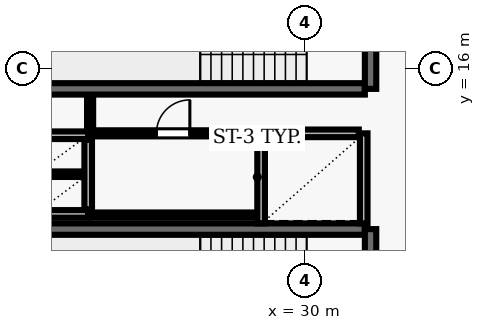
"""IFC4 building model, lengths in metres.
Left out: names, types, materials, properties, quantities, classifications, styles, units other than length and angle.
Written with IfcOpenShell. Run it as: python <this file> out.ifc"""

import sys

from ifc_helpers import new_model, si_unit, direction, frame, frame_2d, origin, place, context, subcontext, project, spatial, rectangle, extrude, element, fill, save


model = new_model("IFC4")
c1 = context("Model", 3, precision=1e-05, world=origin(), true_north=direction((0.0, 1.0)))
c2 = subcontext(c1, "Body", "Model", "MODEL_VIEW")
j1 = project(units=[si_unit("LENGTHUNIT", "METRE"), si_unit("PLANEANGLEUNIT", "RADIAN")], contexts=[c1])
p1 = place(None, origin())
s1 = spatial("IfcSite", under=j1, at=p1, CompositionType="ELEMENT")
p2 = place(p1, origin())
s2 = spatial("IfcBuilding", under=s1, at=p2, CompositionType="ELEMENT")
p3 = place(p2, frame((0.0, 0.0, 42.7)))
s3 = spatial("IfcBuildingStorey", under=s2, at=p3, CompositionType="ELEMENT", Elevation=42.7)
p4 = place(p3, frame((23.22, 15.47, 0.0), z_axis=(0.0, 0.0, 1.0), x_axis=(1.0, 0.0, 0.0)))
e1 = element("IfcWall", 1, at=p4, inside=s3, PredefinedType="SHEAR", context=c2, shape_type="SweptSolid", body=[
    extrude(rectangle(XDim=8.36, YDim=0.3, at=frame_2d((4.18, 0.0))), origin(), (0.0, 0.0, 1.0), 3.69),
])
p5 = place(p3, frame((31.73, 15.47, 0.0), z_axis=(0.0, 0.0, 1.0), x_axis=(0.0, 1.0, 0.0)))
e2 = element("IfcWall", 2, at=p5, inside=s3, PredefinedType="SHEAR", context=c2, shape_type="SweptSolid", body=[
    extrude(rectangle(XDim=3.51, YDim=0.3, at=frame_2d((1.755, 0.0))), origin(), (0.0, 0.0, 1.0), 3.69),
])
p6 = place(p5, frame((1.18, 0.0, 0.0)))
e3 = element("IfcOpeningElement", 3, at=p6, cuts=e2, PredefinedType="OPENING", context=c2, shape_type="SweptSolid", body=[
    extrude(rectangle(XDim=1.15, YDim=2.15, at=frame_2d((0.575, 1.075))), frame((0.0, 0.16, 0.0), z_axis=(0.0, -1.0, 0.0), x_axis=(1.0, 0.0, 0.0)), (0.0, 0.0, 1.0), 0.32),
])
p7 = place(p3, frame((31.58, 11.78, 0.0), z_axis=(0.0, 0.0, 1.0), x_axis=(-1.0, 0.0, 0.0)))
e4 = element("IfcWall", 4, at=p7, inside=s3, PredefinedType="SHEAR", context=c2, shape_type="SweptSolid", body=[
    extrude(rectangle(XDim=8.36, YDim=0.3, at=frame_2d((4.18, 0.0))), origin(), (0.0, 0.0, 1.0), 3.69),
])
p8 = place(p3, frame((31.73, 8.27, 0.0), z_axis=(0.0, 0.0, 1.0), x_axis=(0.0, 1.0, 0.0)))
e5 = element("IfcWall", 5, at=p8, inside=s3, PredefinedType="SHEAR", context=c2, shape_type="SweptSolid", body=[
    extrude(rectangle(XDim=3.51, YDim=0.3, at=frame_2d((1.755, 0.0))), origin(), (0.0, 0.0, 1.0), 3.69),
])
p9 = place(p8, frame((1.18, 0.0, 0.0)))
e6 = element("IfcOpeningElement", 6, at=p9, cuts=e5, PredefinedType="OPENING", context=c2, shape_type="SweptSolid", body=[
    extrude(rectangle(XDim=1.15, YDim=2.15, at=frame_2d((0.575, 1.075))), frame((0.0, 0.16, 0.0), z_axis=(0.0, -1.0, 0.0), x_axis=(1.0, 0.0, 0.0)), (0.0, 0.0, 1.0), 0.32),
])
for number, where, z_axis, x_axis in (
    (7, (28.85, 14.3, 0.0), (0.0, 0.0, 1.0), (0.0, -1.0, 0.0)),
    (8, (31.55, 11.93, 0.0), (0.0, 0.0, 1.0), (0.0, 1.0, 0.0)),
):
    element("IfcWall", number, at=place(p3, frame(where, z_axis=z_axis, x_axis=x_axis)), inside=s3, PredefinedType="SOLIDWALL", context=c2, shape_type="SweptSolid", body=[
        extrude(rectangle(XDim=2.37, YDim=0.2, at=frame_2d((1.185, 0.0))), origin(), (0.0, 0.0, 1.0), 3.69),
    ])
p10 = place(p3, frame((31.42, 14.3, 0.0), z_axis=(0.0, 0.0, 1.0), x_axis=(-1.0, 0.0, 0.0)))
e9 = element("IfcWall", 9, at=p10, inside=s3, PredefinedType="SOLIDWALL", context=c2, shape_type="SweptSolid", body=[
    extrude(rectangle(XDim=2.44, YDim=0.2, at=frame_2d((1.22, 0.0))), origin(), (0.0, 0.0, 1.0), 3.69),
])
for number, where, z_axis, x_axis in (
    (10, (22.9, 14.25, 0.0), (0.0, 0.0, 1.0), (1.0, 0.0, 0.0)),
    (11, (22.9, 12.18, 0.0), (0.0, 0.0, 1.0), (1.0, 0.0, 0.0)),
):
    element("IfcWall", number, at=place(p3, frame(where, z_axis=z_axis, x_axis=x_axis)), inside=s3, PredefinedType="SOLIDWALL", context=c2, shape_type="SweptSolid", body=[
        extrude(rectangle(XDim=1.4, YDim=0.2, at=frame_2d((0.7, 0.0))), origin(), (0.0, 0.0, 1.0), 3.69),
    ])
p11 = place(p3, frame((24.3, 12.3, 0.0), z_axis=(0.0, 0.0, 1.0), x_axis=(0.0, 1.0, 0.0)))
e12 = element("IfcWall", 12, at=p11, inside=s3, PredefinedType="SOLIDWALL", context=c2, shape_type="SweptSolid", body=[
    extrude(rectangle(XDim=1.83, YDim=0.2, at=frame_2d((0.915, 0.0))), origin(), (0.0, 0.0, 1.0), 3.69),
])
p12 = place(p3, frame((23.01, 13.225, 0.0), z_axis=(0.0, 0.0, 1.0), x_axis=(1.0, 0.0, 0.0)))
e13 = element("IfcWall", 13, at=p12, inside=s3, PredefinedType="PARTITIONING", context=c2, shape_type="SweptSolid", body=[
    extrude(rectangle(XDim=1.18, YDim=0.145, at=frame_2d((0.59, 0.0))), origin(), (0.0, 0.0, 1.0), 3.69),
])
p13 = place(p3, frame((24.35, 12.15, 0.0), z_axis=(0.0, 0.0, 1.0), x_axis=(1.0, 0.0, 0.0)))
e14 = element("IfcWall", 14, at=p13, inside=s3, PredefinedType="PARTITIONING", context=c2, shape_type="SweptSolid", body=[
    extrude(rectangle(XDim=4.37, YDim=0.135, at=frame_2d((2.185, 0.0))), origin(), (0.0, 0.0, 1.0), 3.69),
])
p14 = place(p3, frame((24.35, 14.3, 0.0), z_axis=(0.0, 0.0, 1.0), x_axis=(1.0, 0.0, 0.0)))
e15 = element("IfcWall", 15, at=p14, inside=s3, PredefinedType="PARTITIONING", context=c2, shape_type="SweptSolid", body=[
    extrude(rectangle(XDim=4.37, YDim=0.16, at=frame_2d((2.185, 0.0))), origin(), (0.0, 0.0, 1.0), 3.69),
])
p15 = place(p14, frame((1.745, 0.0, 0.0)))
e16 = element("IfcOpeningElement", 16, at=p15, cuts=e15, PredefinedType="OPENING", context=c2, shape_type="SweptSolid", body=[
    extrude(rectangle(XDim=0.88, YDim=2.1, at=frame_2d((0.44, 1.05))), frame((0.0, 0.09, 0.0), z_axis=(0.0, -1.0, 0.0), x_axis=(1.0, 0.0, 0.0)), (0.0, 0.0, 1.0), 0.18),
])
p16 = place(p3, frame((24.35, 15.29, 0.0), z_axis=(0.0, 0.0, 1.0), x_axis=(0.0, -1.0, 0.0)))
e17 = element("IfcWall", 17, at=p16, inside=s3, PredefinedType="PARTITIONING", context=c2, shape_type="SweptSolid", body=[
    extrude(rectangle(XDim=0.915, YDim=0.16, at=frame_2d((0.458, 0.0))), origin(), (0.0, 0.0, 1.0), 3.69),
])
p17 = place(p15, origin())
e18 = element("IfcDoor", 18, at=p17, inside=s3, OperationType="SINGLE_SWING_RIGHT", PredefinedType="DOOR", context=c2, shape_type="SweptSolid", body=[
    extrude(rectangle(XDim=0.88, YDim=2.1, at=frame_2d((0.44, 1.05))), frame((0.0, 0.025, 0.0), z_axis=(0.0, -1.0, 0.0), x_axis=(1.0, 0.0, 0.0)), (0.0, 0.0, 1.0), 0.05),
])
fill(e16, e18)
save(model, sys.argv[1])
